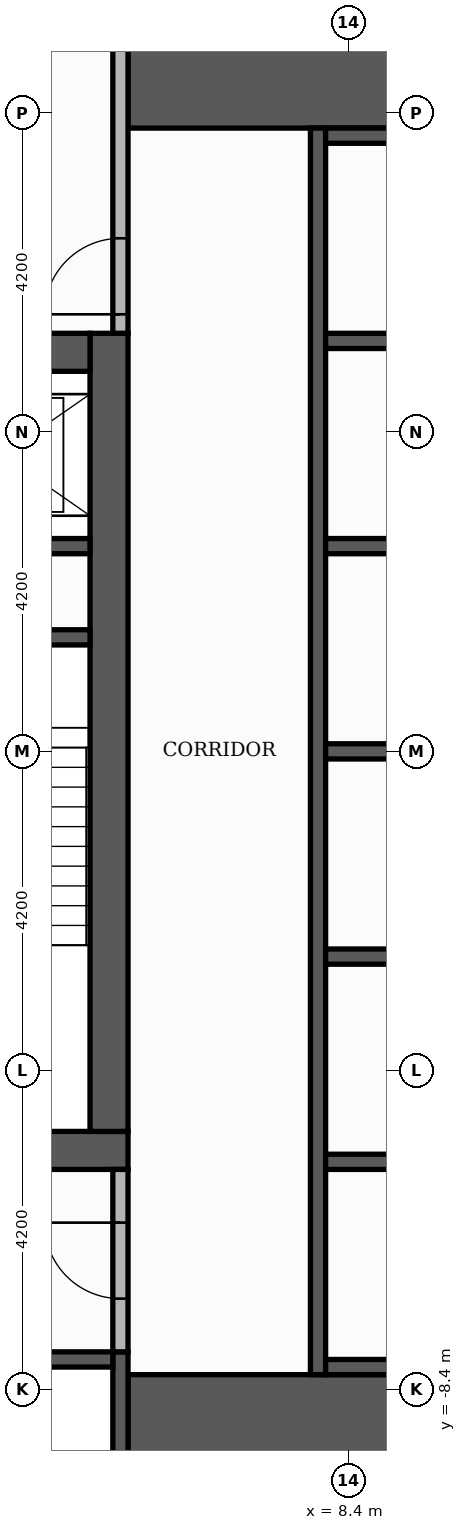
"""IFC4 building model, lengths in metres.
Left out: names, types, materials, properties, quantities, classifications, styles, units other than length and angle.
Written with IfcOpenShell. Run it as: python <this file> out.ifc"""

import sys

from ifc_helpers import new_model, si_unit, direction, frame, frame_2d, origin, place, context, subcontext, project, spatial, rectangle, extrude, element, fill, save


model = new_model("IFC4")
c1 = context("Model", 3, precision=1e-05, world=origin(), true_north=direction((0.0, 1.0)))
c2 = subcontext(c1, "Body", "Model", "MODEL_VIEW")
j1 = project(units=[si_unit("LENGTHUNIT", "METRE"), si_unit("PLANEANGLEUNIT", "RADIAN")], contexts=[c1])
p1 = place(None, origin())
s1 = spatial("IfcSite", under=j1, at=p1, CompositionType="ELEMENT")
p2 = place(p1, origin())
s2 = spatial("IfcBuilding", under=s1, at=p2, CompositionType="ELEMENT")
p3 = place(p2, frame((0.0, 0.0, 122.1)))
s3 = spatial("IfcBuildingStorey", under=s2, at=p3, CompositionType="ELEMENT", Elevation=122.1)
p4 = place(p3, frame((-5.5, -5.25, 0.0), z_axis=(0.0, 0.0, 1.0), x_axis=(1.0, 0.0, 0.0)))
e1 = element("IfcWall", 1, at=p4, inside=s3, PredefinedType="SHEAR", context=c2, shape_type="SweptSolid", body=[
    extrude(rectangle(XDim=11.0, YDim=0.5, at=frame_2d((5.5, 0.0))), origin(), (0.0, 0.0, 1.0), 3.4),
])
p5 = place(p4, frame((4.9, 0.0, 0.0)))
e2 = element("IfcOpeningElement", 2, at=p5, cuts=e1, PredefinedType="OPENING", context=c2, shape_type="SweptSolid", body=[
    extrude(rectangle(XDim=1.2, YDim=2.1, at=frame_2d((0.6, 1.05))), frame((0.0, 0.26, 0.0), z_axis=(0.0, -1.0, 0.0), x_axis=(1.0, 0.0, 0.0)), (0.0, 0.0, 1.0), 0.52),
])
p6 = place(p3, frame((5.25, -5.0, 0.0), z_axis=(0.0, 0.0, 1.0), x_axis=(0.0, 1.0, 0.0)))
e3 = element("IfcWall", 3, at=p6, inside=s3, PredefinedType="SHEAR", context=c2, shape_type="SweptSolid", body=[
    extrude(rectangle(XDim=10.5, YDim=0.5, at=frame_2d((5.25, 0.0))), origin(), (0.0, 0.0, 1.0), 3.4),
])
p7 = place(p3, frame((-5.0, 5.25, 0.0), z_axis=(0.0, 0.0, 1.0), x_axis=(1.0, 0.0, 0.0)))
e4 = element("IfcWall", 4, at=p7, inside=s3, PredefinedType="SHEAR", context=c2, shape_type="SweptSolid", body=[
    extrude(rectangle(XDim=10.0, YDim=0.5, at=frame_2d((5.0, 0.0))), origin(), (0.0, 0.0, 1.0), 3.4),
])
p8 = place(p7, frame((4.4, 0.0, 0.0)))
e5 = element("IfcOpeningElement", 5, at=p8, cuts=e4, PredefinedType="OPENING", context=c2, shape_type="SweptSolid", body=[
    extrude(rectangle(XDim=1.2, YDim=2.1, at=frame_2d((0.6, 1.05))), frame((0.0, 0.26, 0.0), z_axis=(0.0, -1.0, 0.0), x_axis=(1.0, 0.0, 0.0)), (0.0, 0.0, 1.0), 0.52),
])
for number, where, z_axis, x_axis in (
    (6, (5.5, -9.15, 0.0), (0.0, 0.0, 1.0), (1.0, 0.0, 0.0)),
    (7, (5.5, 9.15, 0.0), (0.0, 0.0, 1.0), (1.0, 0.0, 0.0)),
):
    element("IfcWall", number, at=place(p3, frame(where, z_axis=z_axis, x_axis=x_axis)), inside=s3, PredefinedType="SHEAR", context=c2, shape_type="SweptSolid", body=[
        extrude(rectangle(XDim=4.6, YDim=1.9, at=frame_2d((2.3, 0.0))), origin(), (0.0, 0.0, 1.0), 3.4),
    ])
p9 = place(p3, frame((2.15, 1.5, 0.0), z_axis=(0.0, 0.0, 1.0), x_axis=(1.0, 0.0, 0.0)))
e8 = element("IfcWall", 8, at=p9, inside=s3, PredefinedType="SHEAR", context=c2, shape_type="SweptSolid", body=[
    extrude(rectangle(XDim=2.85, YDim=0.2, at=frame_2d((1.425, 0.0))), origin(), (0.0, 0.0, 1.0), 3.4),
])
p10 = place(p3, frame((5.4, -10.1, 0.0), z_axis=(0.0, 0.0, 1.0), x_axis=(0.0, 1.0, 0.0)))
e9 = element("IfcWall", 9, at=p10, inside=s3, PredefinedType="SHEAR", context=c2, shape_type="SweptSolid", body=[
    extrude(rectangle(XDim=2.2, YDim=0.2, at=frame_2d((1.1, 0.0))), origin(), (0.0, 0.0, 1.0), 3.4),
])
p11 = place(p3, frame((8.0, -8.2, 0.0), z_axis=(0.0, 0.0, 1.0), x_axis=(0.0, 1.0, 0.0)))
e10 = element("IfcWall", 10, at=p11, inside=s3, PredefinedType="SHEAR", context=c2, shape_type="SweptSolid", body=[
    extrude(rectangle(XDim=16.4, YDim=0.2, at=frame_2d((8.2, 0.0))), origin(), (0.0, 0.0, 1.0), 3.4),
])
p12 = place(p3, frame((8.1, -8.1, 0.0), z_axis=(0.0, 0.0, 1.0), x_axis=(1.0, 0.0, 0.0)))
e11 = element("IfcWall", 11, at=p12, inside=s3, PredefinedType="SHEAR", context=c2, shape_type="SweptSolid", body=[
    extrude(rectangle(XDim=2.0, YDim=0.2, at=frame_2d((1.0, 0.0))), origin(), (0.0, 0.0, 1.0), 3.4),
])
p13 = place(p3, frame((2.8, -8.0, 0.0), z_axis=(0.0, 0.0, 1.0), x_axis=(1.0, 0.0, 0.0)))
e12 = element("IfcWall", 12, at=p13, inside=s3, PredefinedType="SHEAR", context=c2, shape_type="SweptSolid", body=[
    extrude(rectangle(XDim=2.5, YDim=0.2, at=frame_2d((1.25, 0.0))), origin(), (0.0, 0.0, 1.0), 3.4),
])
for number, where, z_axis, x_axis in (
    (13, (8.1, -5.4, 0.0), (0.0, 0.0, 1.0), (1.0, 0.0, 0.0)),
    (14, (8.1, -2.7, 0.0), (0.0, 0.0, 1.0), (1.0, 0.0, 0.0)),
    (15, (8.1, 0.0, 0.0), (0.0, 0.0, 1.0), (1.0, 0.0, 0.0)),
):
    element("IfcWall", number, at=place(p3, frame(where, z_axis=z_axis, x_axis=x_axis)), inside=s3, PredefinedType="SHEAR", context=c2, shape_type="SweptSolid", body=[
        extrude(rectangle(XDim=2.0, YDim=0.2, at=frame_2d((1.0, 0.0))), origin(), (0.0, 0.0, 1.0), 3.4),
    ])
p14 = place(p3, frame((2.15, 2.7, 0.0), z_axis=(0.0, 0.0, 1.0), x_axis=(1.0, 0.0, 0.0)))
e16 = element("IfcWall", 16, at=p14, inside=s3, PredefinedType="SHEAR", context=c2, shape_type="SweptSolid", body=[
    extrude(rectangle(XDim=2.85, YDim=0.2, at=frame_2d((1.425, 0.0))), origin(), (0.0, 0.0, 1.0), 3.4),
])
for number, where, z_axis, x_axis in (
    (17, (8.1, 2.7, 0.0), (0.0, 0.0, 1.0), (1.0, 0.0, 0.0)),
    (18, (8.1, 5.4, 0.0), (0.0, 0.0, 1.0), (1.0, 0.0, 0.0)),
    (19, (8.1, 8.1, 0.0), (0.0, 0.0, 1.0), (1.0, 0.0, 0.0)),
):
    element("IfcWall", number, at=place(p3, frame(where, z_axis=z_axis, x_axis=x_axis)), inside=s3, PredefinedType="SHEAR", context=c2, shape_type="SweptSolid", body=[
        extrude(rectangle(XDim=2.0, YDim=0.2, at=frame_2d((1.0, 0.0))), origin(), (0.0, 0.0, 1.0), 3.4),
    ])
p15 = place(p3, frame((5.4, -7.9, 0.0), z_axis=(0.0, 0.0, 1.0), x_axis=(0.0, 1.0, 0.0)))
e20 = element("IfcWall", 20, at=p15, inside=s3, PredefinedType="PARTITIONING", context=c2, shape_type="SweptSolid", body=[
    extrude(rectangle(XDim=2.4, YDim=0.2, at=frame_2d((1.2, 0.0))), origin(), (0.0, 0.0, 1.0), 3.4),
])
p16 = place(p15, frame((0.7, 0.0, 0.0)))
e21 = element("IfcOpeningElement", 21, at=p16, cuts=e20, PredefinedType="OPENING", context=c2, shape_type="SweptSolid", body=[
    extrude(rectangle(XDim=1.0, YDim=2.1, at=frame_2d((0.5, 1.05))), frame((0.0, 0.11, 0.0), z_axis=(0.0, -1.0, 0.0), x_axis=(1.0, 0.0, 0.0)), (0.0, 0.0, 1.0), 0.22),
])
p17 = place(p3, frame((5.4, 5.5, 0.0), z_axis=(0.0, 0.0, 1.0), x_axis=(0.0, 1.0, 0.0)))
e22 = element("IfcWall", 22, at=p17, inside=s3, PredefinedType="PARTITIONING", context=c2, shape_type="SweptSolid", body=[
    extrude(rectangle(XDim=4.6, YDim=0.2, at=frame_2d((2.3, 0.0))), origin(), (0.0, 0.0, 1.0), 3.4),
])
p18 = place(p17, frame((0.25, 0.0, 0.0)))
e23 = element("IfcOpeningElement", 23, at=p18, cuts=e22, PredefinedType="OPENING", context=c2, shape_type="SweptSolid", body=[
    extrude(rectangle(XDim=1.0, YDim=2.1, at=frame_2d((0.5, 1.05))), frame((0.0, 0.11, 0.0), z_axis=(0.0, -1.0, 0.0), x_axis=(1.0, 0.0, 0.0)), (0.0, 0.0, 1.0), 0.22),
])
p19 = place(p18, origin())
e24 = element("IfcDoor", 24, at=p19, inside=s3, OperationType="SINGLE_SWING_LEFT", PredefinedType="DOOR", context=c2, shape_type="SweptSolid", body=[
    extrude(rectangle(XDim=1.0, YDim=2.1, at=frame_2d((0.5, 1.05))), frame((0.0, 0.025, 0.0), z_axis=(0.0, -1.0, 0.0), x_axis=(1.0, 0.0, 0.0)), (0.0, 0.0, 1.0), 0.05),
])
fill(e23, e24)
p20 = place(p16, origin())
e25 = element("IfcDoor", 25, at=p20, inside=s3, OperationType="SINGLE_SWING_RIGHT", PredefinedType="DOOR", context=c2, shape_type="SweptSolid", body=[
    extrude(rectangle(XDim=1.0, YDim=2.1, at=frame_2d((0.5, 1.05))), frame((0.0, 0.025, 0.0), z_axis=(0.0, -1.0, 0.0), x_axis=(1.0, 0.0, 0.0)), (0.0, 0.0, 1.0), 0.05),
])
fill(e21, e25)
save(model, sys.argv[1])
